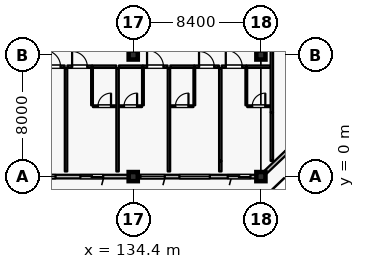
"""IFC4 building model, lengths in metres.
Left out: names, types, materials, properties, quantities, classifications, styles, units other than length and angle.
Written with IfcOpenShell. Run it as: python <this file> out.ifc"""

import sys

from ifc_helpers import new_model, si_unit, direction, frame, frame_2d, origin, origin_2d, place, context, subcontext, project, spatial, rectangle, extrude, element, fill, save


model = new_model("IFC4")
c1 = context("Model", 3, precision=1e-05, world=origin(), true_north=direction((0.0, 1.0)))
c2 = subcontext(c1, "Body", "Model", "MODEL_VIEW")
j1 = project(units=[si_unit("LENGTHUNIT", "METRE"), si_unit("PLANEANGLEUNIT", "RADIAN")], contexts=[c1])
p1 = place(None, origin())
s1 = spatial("IfcSite", under=j1, at=p1, CompositionType="ELEMENT")
p2 = place(p1, origin())
s2 = spatial("IfcBuilding", under=s1, at=p2, CompositionType="ELEMENT")
p3 = place(p2, frame((0.0, 0.0, 43.2)))
s3 = spatial("IfcBuildingStorey", under=s2, at=p3, CompositionType="ELEMENT", Elevation=43.2)
for number, where, z_axis, x_axis in (
    (1, (134.4, 0.0, 0.0), (0.0, 0.0, 1.0), (1.0, 0.0, 0.0)),
    (2, (142.8, 0.0, 0.0), (0.0, 0.0, 1.0), (1.0, 0.0, 0.0)),
    (3, (134.4, 8.0, 0.0), (0.0, 0.0, 1.0), (1.0, 0.0, 0.0)),
    (4, (142.8, 8.0, 0.0), (0.0, 0.0, 1.0), (1.0, 0.0, 0.0)),
):
    element("IfcColumn", number, at=place(p3, frame(where, z_axis=z_axis, x_axis=x_axis)), inside=s3, PredefinedType="COLUMN", context=c2, shape_type="SweptSolid", body=[
        extrude(rectangle(XDim=0.6, YDim=0.6, at=origin_2d()), origin(), (0.0, 0.0, 1.0), 4.2),
    ])
p4 = place(p3, frame((134.1, 0.0, 0.0), z_axis=(0.0, 0.0, 1.0), x_axis=(-1.0, 0.0, 0.0)))
e5 = element("IfcWall", 5, at=p4, inside=s3, PredefinedType="SOLIDWALL", context=c2, shape_type="SweptSolid", body=[
    extrude(rectangle(XDim=7.8, YDim=0.24, at=frame_2d((3.9, 0.0))), origin(), (0.0, 0.0, 1.0), 3.54),
])
p5 = place(p4, frame((1.675, 0.0, 0.0)))
e6 = element("IfcOpeningElement", 6, at=p5, cuts=e5, PredefinedType="OPENING", context=c2, shape_type="SweptSolid", body=[
    extrude(rectangle(XDim=1.5, YDim=2.25, at=frame_2d((0.75, 1.125))), frame((0.0, 0.13, 0.0), z_axis=(0.0, -1.0, 0.0), x_axis=(1.0, 0.0, 0.0)), (0.0, 0.0, 1.0), 0.26),
])
p6 = place(p4, frame((4.81, 0.0, 0.8)))
e7 = element("IfcOpeningElement", 7, at=p6, cuts=e5, PredefinedType="OPENING", context=c2, shape_type="SweptSolid", body=[
    extrude(rectangle(XDim=2.0, YDim=1.75, at=frame_2d((1.0, 0.875))), frame((0.0, 0.13, 0.0), z_axis=(0.0, -1.0, 0.0), x_axis=(1.0, 0.0, 0.0)), (0.0, 0.0, 1.0), 0.26),
])
p7 = place(p3, frame((142.5, 0.0, 0.0), z_axis=(0.0, 0.0, 1.0), x_axis=(-1.0, 0.0, 0.0)))
e8 = element("IfcWall", 8, at=p7, inside=s3, PredefinedType="SOLIDWALL", context=c2, shape_type="SweptSolid", body=[
    extrude(rectangle(XDim=7.8, YDim=0.24, at=frame_2d((3.9, 0.0))), origin(), (0.0, 0.0, 1.0), 3.54),
])
p8 = place(p7, frame((0.385, 0.0, 0.0)))
e9 = element("IfcOpeningElement", 9, at=p8, cuts=e8, PredefinedType="OPENING", context=c2, shape_type="SweptSolid", body=[
    extrude(rectangle(XDim=1.5, YDim=2.25, at=frame_2d((0.75, 1.125))), frame((0.0, 0.13, 0.0), z_axis=(0.0, -1.0, 0.0), x_axis=(1.0, 0.0, 0.0)), (0.0, 0.0, 1.0), 0.26),
])
p9 = place(p7, frame((3.06, 0.0, 0.8)))
e10 = element("IfcOpeningElement", 10, at=p9, cuts=e8, PredefinedType="OPENING", context=c2, shape_type="SweptSolid", body=[
    extrude(rectangle(XDim=2.0, YDim=1.75, at=frame_2d((1.0, 0.875))), frame((0.0, 0.13, 0.0), z_axis=(0.0, -1.0, 0.0), x_axis=(1.0, 0.0, 0.0)), (0.0, 0.0, 1.0), 0.26),
])
p10 = place(p7, frame((6.025, 0.0, 0.8)))
e11 = element("IfcOpeningElement", 11, at=p10, cuts=e8, PredefinedType="OPENING", context=c2, shape_type="SweptSolid", body=[
    extrude(rectangle(XDim=1.6, YDim=1.6, at=frame_2d((0.8, 0.8))), frame((0.0, 0.13, 0.0), z_axis=(0.0, -1.0, 0.0), x_axis=(1.0, 0.0, 0.0)), (0.0, 0.0, 1.0), 0.26),
])
p11 = place(p3, frame((150.9, 7.714, 0.0), z_axis=(0.0, 0.0, 1.0), x_axis=(-0.724145477467, -0.689647248573, 0.0)))
e12 = element("IfcWall", 12, at=p11, inside=s3, PredefinedType="SOLIDWALL", context=c2, shape_type="SweptSolid", body=[
    extrude(rectangle(XDim=10.771, YDim=0.24, at=frame_2d((5.385, 0.0))), origin(), (0.0, 0.0, 1.0), 3.54),
])
p12 = place(p11, frame((2.44, 0.0, 0.0)))
e13 = element("IfcOpeningElement", 13, at=p12, cuts=e12, PredefinedType="OPENING", context=c2, shape_type="SweptSolid", body=[
    extrude(rectangle(XDim=1.5, YDim=2.25, at=frame_2d((0.75, 1.125))), frame((0.0, 0.13, 0.0), z_axis=(0.0, -1.0, 0.0), x_axis=(1.0, 0.0, 0.0)), (0.0, 0.0, 1.0), 0.26),
])
p13 = place(p11, frame((6.857, 0.0, 0.8)))
e14 = element("IfcOpeningElement", 14, at=p13, cuts=e12, PredefinedType="OPENING", context=c2, shape_type="SweptSolid", body=[
    extrude(rectangle(XDim=2.0, YDim=1.75, at=frame_2d((1.0, 0.875))), frame((0.0, 0.13, 0.0), z_axis=(0.0, -1.0, 0.0), x_axis=(1.0, 0.0, 0.0)), (0.0, 0.0, 1.0), 0.26),
])
p14 = place(p3, frame((128.27, 7.23, 0.0), z_axis=(0.0, 0.0, 1.0), x_axis=(1.0, 0.0, 0.0)))
e15 = element("IfcWall", 15, at=p14, inside=s3, PredefinedType="PARTITIONING", context=c2, shape_type="SweptSolid", body=[
    extrude(rectangle(XDim=1.62, YDim=0.16, at=frame_2d((0.81, 0.0))), origin(), (0.0, 0.0, 1.0), 3.935),
])
p15 = place(p14, frame((0.27, 0.0, 0.0)))
e16 = element("IfcOpeningElement", 16, at=p15, cuts=e15, PredefinedType="OPENING", context=c2, shape_type="SweptSolid", body=[
    extrude(rectangle(XDim=1.08, YDim=2.3, at=frame_2d((0.54, 1.15))), frame((0.0, 0.09, 0.0), z_axis=(0.0, -1.0, 0.0), x_axis=(1.0, 0.0, 0.0)), (0.0, 0.0, 1.0), 0.18),
])
p16 = place(p3, frame((130.07, 7.23, 0.0), z_axis=(0.0, 0.0, 1.0), x_axis=(1.0, 0.0, 0.0)))
e17 = element("IfcWall", 17, at=p16, inside=s3, PredefinedType="PARTITIONING", context=c2, shape_type="SweptSolid", body=[
    extrude(rectangle(XDim=1.62, YDim=0.16, at=frame_2d((0.81, 0.0))), origin(), (0.0, 0.0, 1.0), 3.935),
])
p17 = place(p16, frame((0.31, 0.0, 0.0)))
e18 = element("IfcOpeningElement", 18, at=p17, cuts=e17, PredefinedType="OPENING", context=c2, shape_type="SweptSolid", body=[
    extrude(rectangle(XDim=1.0, YDim=2.25, at=frame_2d((0.5, 1.125))), frame((0.0, 0.09, 0.0), z_axis=(0.0, -1.0, 0.0), x_axis=(1.0, 0.0, 0.0)), (0.0, 0.0, 1.0), 0.18),
])
p18 = place(p3, frame((131.7, 7.23, 0.0), z_axis=(0.0, 0.0, 1.0), x_axis=(1.0, 0.0, 0.0)))
e19 = element("IfcWall", 19, at=p18, inside=s3, PredefinedType="PARTITIONING", context=c2, shape_type="SweptSolid", body=[
    extrude(rectangle(XDim=1.58, YDim=0.16, at=frame_2d((0.79, 0.0))), origin(), (0.0, 0.0, 1.0), 3.935),
])
p19 = place(p3, frame((131.69, 4.69, 0.0), z_axis=(0.0, 0.0, 1.0), x_axis=(0.0, 1.0, 0.0)))
e20 = element("IfcWall", 20, at=p19, inside=s3, PredefinedType="PARTITIONING", context=c2, shape_type="SweptSolid", body=[
    extrude(rectangle(XDim=2.45, YDim=0.115, at=frame_2d((1.225, 0.0))), origin(), (0.0, 0.0, 1.0), 3.935),
])
p20 = place(p3, frame((131.75, 4.63, 0.0), z_axis=(0.0, 0.0, 1.0), x_axis=(1.0, 0.0, 0.0)))
e21 = element("IfcWall", 21, at=p20, inside=s3, PredefinedType="PARTITIONING", context=c2, shape_type="SweptSolid", body=[
    extrude(rectangle(XDim=1.52, YDim=0.115, at=frame_2d((0.76, 0.0))), origin(), (0.0, 0.0, 1.0), 3.935),
])
p21 = place(p20, frame((0.33, 0.0, 0.0)))
e22 = element("IfcOpeningElement", 22, at=p21, cuts=e21, PredefinedType="OPENING", context=c2, shape_type="SweptSolid", body=[
    extrude(rectangle(XDim=0.86, YDim=2.12, at=frame_2d((0.43, 1.06))), frame((0.0, 0.067, 0.0), z_axis=(0.0, -1.0, 0.0), x_axis=(1.0, 0.0, 0.0)), (0.0, 0.0, 1.0), 0.135),
])
p22 = place(p3, frame((129.98, 0.34, 0.0), z_axis=(0.0, 0.0, 1.0), x_axis=(0.0, 1.0, 0.0)))
e23 = element("IfcWall", 23, at=p22, inside=s3, PredefinedType="PARTITIONING", context=c2, shape_type="SweptSolid", body=[
    extrude(rectangle(XDim=6.8, YDim=0.16, at=frame_2d((3.4, 0.0))), origin(), (0.0, 0.0, 1.0), 3.935),
])
p23 = place(p3, frame((133.46, 7.23, 0.0), z_axis=(0.0, 0.0, 1.0), x_axis=(1.0, 0.0, 0.0)))
e24 = element("IfcWall", 24, at=p23, inside=s3, PredefinedType="PARTITIONING", context=c2, shape_type="SweptSolid", body=[
    extrude(rectangle(XDim=1.57, YDim=0.16, at=frame_2d((0.785, 0.0))), origin(), (0.0, 0.0, 1.0), 3.935),
])
p24 = place(p3, frame((135.04, 7.23, 0.0), z_axis=(0.0, 0.0, 1.0), x_axis=(1.0, 0.0, 0.0)))
e25 = element("IfcWall", 25, at=p24, inside=s3, PredefinedType="PARTITIONING", context=c2, shape_type="SweptSolid", body=[
    extrude(rectangle(XDim=1.62, YDim=0.16, at=frame_2d((0.81, 0.0))), origin(), (0.0, 0.0, 1.0), 3.935),
])
p25 = place(p24, frame((0.27, 0.0, 0.0)))
e26 = element("IfcOpeningElement", 26, at=p25, cuts=e25, PredefinedType="OPENING", context=c2, shape_type="SweptSolid", body=[
    extrude(rectangle(XDim=1.08, YDim=2.3, at=frame_2d((0.54, 1.15))), frame((0.0, 0.09, 0.0), z_axis=(0.0, -1.0, 0.0), x_axis=(1.0, 0.0, 0.0)), (0.0, 0.0, 1.0), 0.18),
])
p26 = place(p3, frame((135.04, 4.69, 0.0), z_axis=(0.0, 0.0, 1.0), x_axis=(0.0, 1.0, 0.0)))
e27 = element("IfcWall", 27, at=p26, inside=s3, PredefinedType="PARTITIONING", context=c2, shape_type="SweptSolid", body=[
    extrude(rectangle(XDim=2.45, YDim=0.115, at=frame_2d((1.225, 0.0))), origin(), (0.0, 0.0, 1.0), 3.935),
])
p27 = place(p3, frame((133.47, 4.63, 0.0), z_axis=(0.0, 0.0, 1.0), x_axis=(1.0, 0.0, 0.0)))
e28 = element("IfcWall", 28, at=p27, inside=s3, PredefinedType="PARTITIONING", context=c2, shape_type="SweptSolid", body=[
    extrude(rectangle(XDim=1.51, YDim=0.115, at=frame_2d((0.755, 0.0))), origin(), (0.0, 0.0, 1.0), 3.935),
])
p28 = place(p27, frame((0.325, 0.0, 0.0)))
e29 = element("IfcOpeningElement", 29, at=p28, cuts=e28, PredefinedType="OPENING", context=c2, shape_type="SweptSolid", body=[
    extrude(rectangle(XDim=0.86, YDim=2.12, at=frame_2d((0.43, 1.06))), frame((0.0, 0.067, 0.0), z_axis=(0.0, -1.0, 0.0), x_axis=(1.0, 0.0, 0.0)), (0.0, 0.0, 1.0), 0.135),
])
p29 = place(p3, frame((133.37, 0.34, 0.0), z_axis=(0.0, 0.0, 1.0), x_axis=(0.0, 1.0, 0.0)))
e30 = element("IfcWall", 30, at=p29, inside=s3, PredefinedType="PARTITIONING", context=c2, shape_type="SweptSolid", body=[
    extrude(rectangle(XDim=6.8, YDim=0.16, at=frame_2d((3.4, 0.0))), origin(), (0.0, 0.0, 1.0), 3.935),
])
p30 = place(p3, frame((136.84, 7.23, 0.0), z_axis=(0.0, 0.0, 1.0), x_axis=(1.0, 0.0, 0.0)))
e31 = element("IfcWall", 31, at=p30, inside=s3, PredefinedType="PARTITIONING", context=c2, shape_type="SweptSolid", body=[
    extrude(rectangle(XDim=1.57, YDim=0.16, at=frame_2d((0.785, 0.0))), origin(), (0.0, 0.0, 1.0), 3.935),
])
p31 = place(p3, frame((138.42, 7.23, 0.0), z_axis=(0.0, 0.0, 1.0), x_axis=(1.0, 0.0, 0.0)))
e32 = element("IfcWall", 32, at=p31, inside=s3, PredefinedType="PARTITIONING", context=c2, shape_type="SweptSolid", body=[
    extrude(rectangle(XDim=1.62, YDim=0.16, at=frame_2d((0.81, 0.0))), origin(), (0.0, 0.0, 1.0), 3.935),
])
p32 = place(p31, frame((0.31, 0.0, 0.0)))
e33 = element("IfcOpeningElement", 33, at=p32, cuts=e32, PredefinedType="OPENING", context=c2, shape_type="SweptSolid", body=[
    extrude(rectangle(XDim=1.0, YDim=2.25, at=frame_2d((0.5, 1.125))), frame((0.0, 0.09, 0.0), z_axis=(0.0, -1.0, 0.0), x_axis=(1.0, 0.0, 0.0)), (0.0, 0.0, 1.0), 0.18),
])
p33 = place(p3, frame((138.42, 4.69, 0.0), z_axis=(0.0, 0.0, 1.0), x_axis=(0.0, 1.0, 0.0)))
e34 = element("IfcWall", 34, at=p33, inside=s3, PredefinedType="PARTITIONING", context=c2, shape_type="SweptSolid", body=[
    extrude(rectangle(XDim=2.45, YDim=0.115, at=frame_2d((1.225, 0.0))), origin(), (0.0, 0.0, 1.0), 3.935),
])
p34 = place(p3, frame((136.85, 4.63, 0.0), z_axis=(0.0, 0.0, 1.0), x_axis=(1.0, 0.0, 0.0)))
e35 = element("IfcWall", 35, at=p34, inside=s3, PredefinedType="PARTITIONING", context=c2, shape_type="SweptSolid", body=[
    extrude(rectangle(XDim=1.51, YDim=0.115, at=frame_2d((0.755, 0.0))), origin(), (0.0, 0.0, 1.0), 3.935),
])
p35 = place(p34, frame((0.325, 0.0, 0.0)))
e36 = element("IfcOpeningElement", 36, at=p35, cuts=e35, PredefinedType="OPENING", context=c2, shape_type="SweptSolid", body=[
    extrude(rectangle(XDim=0.86, YDim=2.12, at=frame_2d((0.43, 1.06))), frame((0.0, 0.067, 0.0), z_axis=(0.0, -1.0, 0.0), x_axis=(1.0, 0.0, 0.0)), (0.0, 0.0, 1.0), 0.135),
])
p36 = place(p3, frame((136.75, 0.34, 0.0), z_axis=(0.0, 0.0, 1.0), x_axis=(0.0, 1.0, 0.0)))
e37 = element("IfcWall", 37, at=p36, inside=s3, PredefinedType="PARTITIONING", context=c2, shape_type="SweptSolid", body=[
    extrude(rectangle(XDim=6.8, YDim=0.16, at=frame_2d((3.4, 0.0))), origin(), (0.0, 0.0, 1.0), 3.935),
])
p37 = place(p3, frame((140.13, 0.34, 0.0), z_axis=(0.0, 0.0, 1.0), x_axis=(0.0, 1.0, 0.0)))
e38 = element("IfcWall", 38, at=p37, inside=s3, PredefinedType="PARTITIONING", context=c2, shape_type="SweptSolid", body=[
    extrude(rectangle(XDim=0.68, YDim=0.16, at=frame_2d((0.34, 0.0))), origin(), (0.0, 0.0, 1.0), 3.935),
])
p38 = place(p3, frame((140.22, 7.23, 0.0), z_axis=(0.0, 0.0, 1.0), x_axis=(1.0, 0.0, 0.0)))
e39 = element("IfcWall", 39, at=p38, inside=s3, PredefinedType="PARTITIONING", context=c2, shape_type="SweptSolid", body=[
    extrude(rectangle(XDim=1.62, YDim=0.16, at=frame_2d((0.81, 0.0))), origin(), (0.0, 0.0, 1.0), 3.935),
])
p39 = place(p38, frame((0.27, 0.0, 0.0)))
e40 = element("IfcOpeningElement", 40, at=p39, cuts=e39, PredefinedType="OPENING", context=c2, shape_type="SweptSolid", body=[
    extrude(rectangle(XDim=1.08, YDim=2.3, at=frame_2d((0.54, 1.15))), frame((0.0, 0.09, 0.0), z_axis=(0.0, -1.0, 0.0), x_axis=(1.0, 0.0, 0.0)), (0.0, 0.0, 1.0), 0.18),
])
p40 = place(p3, frame((141.85, 7.23, 0.0), z_axis=(0.0, 0.0, 1.0), x_axis=(1.0, 0.0, 0.0)))
e41 = element("IfcWall", 41, at=p40, inside=s3, PredefinedType="PARTITIONING", context=c2, shape_type="SweptSolid", body=[
    extrude(rectangle(XDim=1.58, YDim=0.16, at=frame_2d((0.79, 0.0))), origin(), (0.0, 0.0, 1.0), 3.935),
])
p41 = place(p3, frame((141.84, 4.69, 0.0), z_axis=(0.0, 0.0, 1.0), x_axis=(0.0, 1.0, 0.0)))
e42 = element("IfcWall", 42, at=p41, inside=s3, PredefinedType="PARTITIONING", context=c2, shape_type="SweptSolid", body=[
    extrude(rectangle(XDim=2.45, YDim=0.115, at=frame_2d((1.225, 0.0))), origin(), (0.0, 0.0, 1.0), 3.935),
])
p42 = place(p3, frame((141.9, 4.63, 0.0), z_axis=(0.0, 0.0, 1.0), x_axis=(1.0, 0.0, 0.0)))
e43 = element("IfcWall", 43, at=p42, inside=s3, PredefinedType="PARTITIONING", context=c2, shape_type="SweptSolid", body=[
    extrude(rectangle(XDim=1.52, YDim=0.115, at=frame_2d((0.76, 0.0))), origin(), (0.0, 0.0, 1.0), 3.935),
])
p43 = place(p42, frame((0.33, 0.0, 0.0)))
e44 = element("IfcOpeningElement", 44, at=p43, cuts=e43, PredefinedType="OPENING", context=c2, shape_type="SweptSolid", body=[
    extrude(rectangle(XDim=0.86, YDim=2.12, at=frame_2d((0.43, 1.06))), frame((0.0, 0.067, 0.0), z_axis=(0.0, -1.0, 0.0), x_axis=(1.0, 0.0, 0.0)), (0.0, 0.0, 1.0), 0.135),
])
p44 = place(p3, frame((140.13, 1.03, 0.0), z_axis=(0.0, 0.0, 1.0), x_axis=(0.0, 1.0, 0.0)))
e45 = element("IfcWall", 45, at=p44, inside=s3, PredefinedType="PARTITIONING", context=c2, shape_type="SweptSolid", body=[
    extrude(rectangle(XDim=6.11, YDim=0.16, at=frame_2d((3.055, 0.0))), origin(), (0.0, 0.0, 1.0), 3.935),
])
p45 = place(p3, frame((143.52, 1.03, 0.0), z_axis=(0.0, 0.0, 1.0), x_axis=(0.0, 1.0, 0.0)))
e46 = element("IfcWall", 46, at=p45, inside=s3, PredefinedType="PARTITIONING", context=c2, shape_type="SweptSolid", body=[
    extrude(rectangle(XDim=3.2, YDim=0.16, at=frame_2d((1.6, 0.0))), origin(), (0.0, 0.0, 1.0), 3.935),
])
p46 = place(p3, frame((143.52, 4.24, 0.0), z_axis=(0.0, 0.0, 1.0), x_axis=(0.0, 1.0, 0.0)))
e47 = element("IfcWall", 47, at=p46, inside=s3, PredefinedType="PARTITIONING", context=c2, shape_type="SweptSolid", body=[
    extrude(rectangle(XDim=9.55, YDim=0.16, at=frame_2d((4.775, 0.0))), origin(), (0.0, 0.0, 1.0), 3.935),
])
p47 = place(p5, origin())
e48 = element("IfcDoor", 48, at=p47, inside=s3, OperationType="SLIDING_TO_LEFT", PredefinedType="DOOR", context=c2, shape_type="SweptSolid", body=[
    extrude(rectangle(XDim=1.5, YDim=2.25, at=frame_2d((0.75, 1.125))), frame((0.0, 0.025, 0.0), z_axis=(0.0, -1.0, 0.0), x_axis=(1.0, 0.0, 0.0)), (0.0, 0.0, 1.0), 0.05),
])
fill(e6, e48)
p48 = place(p6, origin())
e49 = element("IfcWindow", 49, at=p48, inside=s3, PartitioningType="DOUBLE_PANEL_VERTICAL", PredefinedType="WINDOW", context=c2, shape_type="SweptSolid", body=[
    extrude(rectangle(XDim=2.0, YDim=1.75, at=frame_2d((1.0, 0.875))), frame((0.0, 0.03, 0.0), z_axis=(0.0, -1.0, 0.0), x_axis=(1.0, 0.0, 0.0)), (0.0, 0.0, 1.0), 0.06),
])
fill(e7, e49)
p49 = place(p8, origin())
e50 = element("IfcDoor", 50, at=p49, inside=s3, OperationType="SLIDING_TO_LEFT", PredefinedType="DOOR", context=c2, shape_type="SweptSolid", body=[
    extrude(rectangle(XDim=1.5, YDim=2.25, at=frame_2d((0.75, 1.125))), frame((0.0, 0.025, 0.0), z_axis=(0.0, -1.0, 0.0), x_axis=(1.0, 0.0, 0.0)), (0.0, 0.0, 1.0), 0.05),
])
fill(e9, e50)
p50 = place(p9, origin())
e51 = element("IfcWindow", 51, at=p50, inside=s3, PartitioningType="DOUBLE_PANEL_VERTICAL", PredefinedType="WINDOW", context=c2, shape_type="SweptSolid", body=[
    extrude(rectangle(XDim=2.0, YDim=1.75, at=frame_2d((1.0, 0.875))), frame((0.0, 0.03, 0.0), z_axis=(0.0, -1.0, 0.0), x_axis=(1.0, 0.0, 0.0)), (0.0, 0.0, 1.0), 0.06),
])
fill(e10, e51)
p51 = place(p10, origin())
e52 = element("IfcWindow", 52, at=p51, inside=s3, PartitioningType="SINGLE_PANEL", PredefinedType="WINDOW", context=c2, shape_type="SweptSolid", body=[
    extrude(rectangle(XDim=1.6, YDim=1.6, at=frame_2d((0.8, 0.8))), frame((0.0, 0.03, 0.0), z_axis=(0.0, -1.0, 0.0), x_axis=(1.0, 0.0, 0.0)), (0.0, 0.0, 1.0), 0.06),
])
fill(e11, e52)
p52 = place(p15, origin())
e53 = element("IfcDoor", 53, at=p52, inside=s3, OperationType="SINGLE_SWING_LEFT", PredefinedType="DOOR", context=c2, shape_type="SweptSolid", body=[
    extrude(rectangle(XDim=1.08, YDim=2.3, at=frame_2d((0.54, 1.15))), frame((0.0, 0.025, 0.0), z_axis=(0.0, -1.0, 0.0), x_axis=(1.0, 0.0, 0.0)), (0.0, 0.0, 1.0), 0.05),
])
fill(e16, e53)
p53 = place(p17, origin())
e54 = element("IfcDoor", 54, at=p53, inside=s3, OperationType="SINGLE_SWING_LEFT", PredefinedType="DOOR", context=c2, shape_type="SweptSolid", body=[
    extrude(rectangle(XDim=1.0, YDim=2.25, at=frame_2d((0.5, 1.125))), frame((0.0, 0.025, 0.0), z_axis=(0.0, -1.0, 0.0), x_axis=(1.0, 0.0, 0.0)), (0.0, 0.0, 1.0), 0.05),
])
fill(e18, e54)
p54 = place(p21, origin())
e55 = element("IfcDoor", 55, at=p54, inside=s3, OperationType="SINGLE_SWING_RIGHT", PredefinedType="DOOR", context=c2, shape_type="SweptSolid", body=[
    extrude(rectangle(XDim=0.86, YDim=2.12, at=frame_2d((0.43, 1.06))), frame((0.0, 0.025, 0.0), z_axis=(0.0, -1.0, 0.0), x_axis=(1.0, 0.0, 0.0)), (0.0, 0.0, 1.0), 0.05),
])
fill(e22, e55)
p55 = place(p25, origin())
e56 = element("IfcDoor", 56, at=p55, inside=s3, OperationType="SINGLE_SWING_LEFT", PredefinedType="DOOR", context=c2, shape_type="SweptSolid", body=[
    extrude(rectangle(XDim=1.08, YDim=2.3, at=frame_2d((0.54, 1.15))), frame((0.0, 0.025, 0.0), z_axis=(0.0, -1.0, 0.0), x_axis=(1.0, 0.0, 0.0)), (0.0, 0.0, 1.0), 0.05),
])
fill(e26, e56)
p56 = place(p28, origin())
e57 = element("IfcDoor", 57, at=p56, inside=s3, OperationType="SINGLE_SWING_RIGHT", PredefinedType="DOOR", context=c2, shape_type="SweptSolid", body=[
    extrude(rectangle(XDim=0.86, YDim=2.12, at=frame_2d((0.43, 1.06))), frame((0.0, 0.025, 0.0), z_axis=(0.0, -1.0, 0.0), x_axis=(1.0, 0.0, 0.0)), (0.0, 0.0, 1.0), 0.05),
])
fill(e29, e57)
p57 = place(p32, origin())
e58 = element("IfcDoor", 58, at=p57, inside=s3, OperationType="SINGLE_SWING_LEFT", PredefinedType="DOOR", context=c2, shape_type="SweptSolid", body=[
    extrude(rectangle(XDim=1.0, YDim=2.25, at=frame_2d((0.5, 1.125))), frame((0.0, 0.025, 0.0), z_axis=(0.0, -1.0, 0.0), x_axis=(1.0, 0.0, 0.0)), (0.0, 0.0, 1.0), 0.05),
])
fill(e33, e58)
p58 = place(p35, origin())
e59 = element("IfcDoor", 59, at=p58, inside=s3, OperationType="SINGLE_SWING_RIGHT", PredefinedType="DOOR", context=c2, shape_type="SweptSolid", body=[
    extrude(rectangle(XDim=0.86, YDim=2.12, at=frame_2d((0.43, 1.06))), frame((0.0, 0.025, 0.0), z_axis=(0.0, -1.0, 0.0), x_axis=(1.0, 0.0, 0.0)), (0.0, 0.0, 1.0), 0.05),
])
fill(e36, e59)
p59 = place(p39, origin())
e60 = element("IfcDoor", 60, at=p59, inside=s3, OperationType="SINGLE_SWING_LEFT", PredefinedType="DOOR", context=c2, shape_type="SweptSolid", body=[
    extrude(rectangle(XDim=1.08, YDim=2.3, at=frame_2d((0.54, 1.15))), frame((0.0, 0.025, 0.0), z_axis=(0.0, -1.0, 0.0), x_axis=(1.0, 0.0, 0.0)), (0.0, 0.0, 1.0), 0.05),
])
fill(e40, e60)
p60 = place(p43, origin())
e61 = element("IfcDoor", 61, at=p60, inside=s3, OperationType="SINGLE_SWING_RIGHT", PredefinedType="DOOR", context=c2, shape_type="SweptSolid", body=[
    extrude(rectangle(XDim=0.86, YDim=2.12, at=frame_2d((0.43, 1.06))), frame((0.0, 0.025, 0.0), z_axis=(0.0, -1.0, 0.0), x_axis=(1.0, 0.0, 0.0)), (0.0, 0.0, 1.0), 0.05),
])
fill(e44, e61)
save(model, sys.argv[1])
